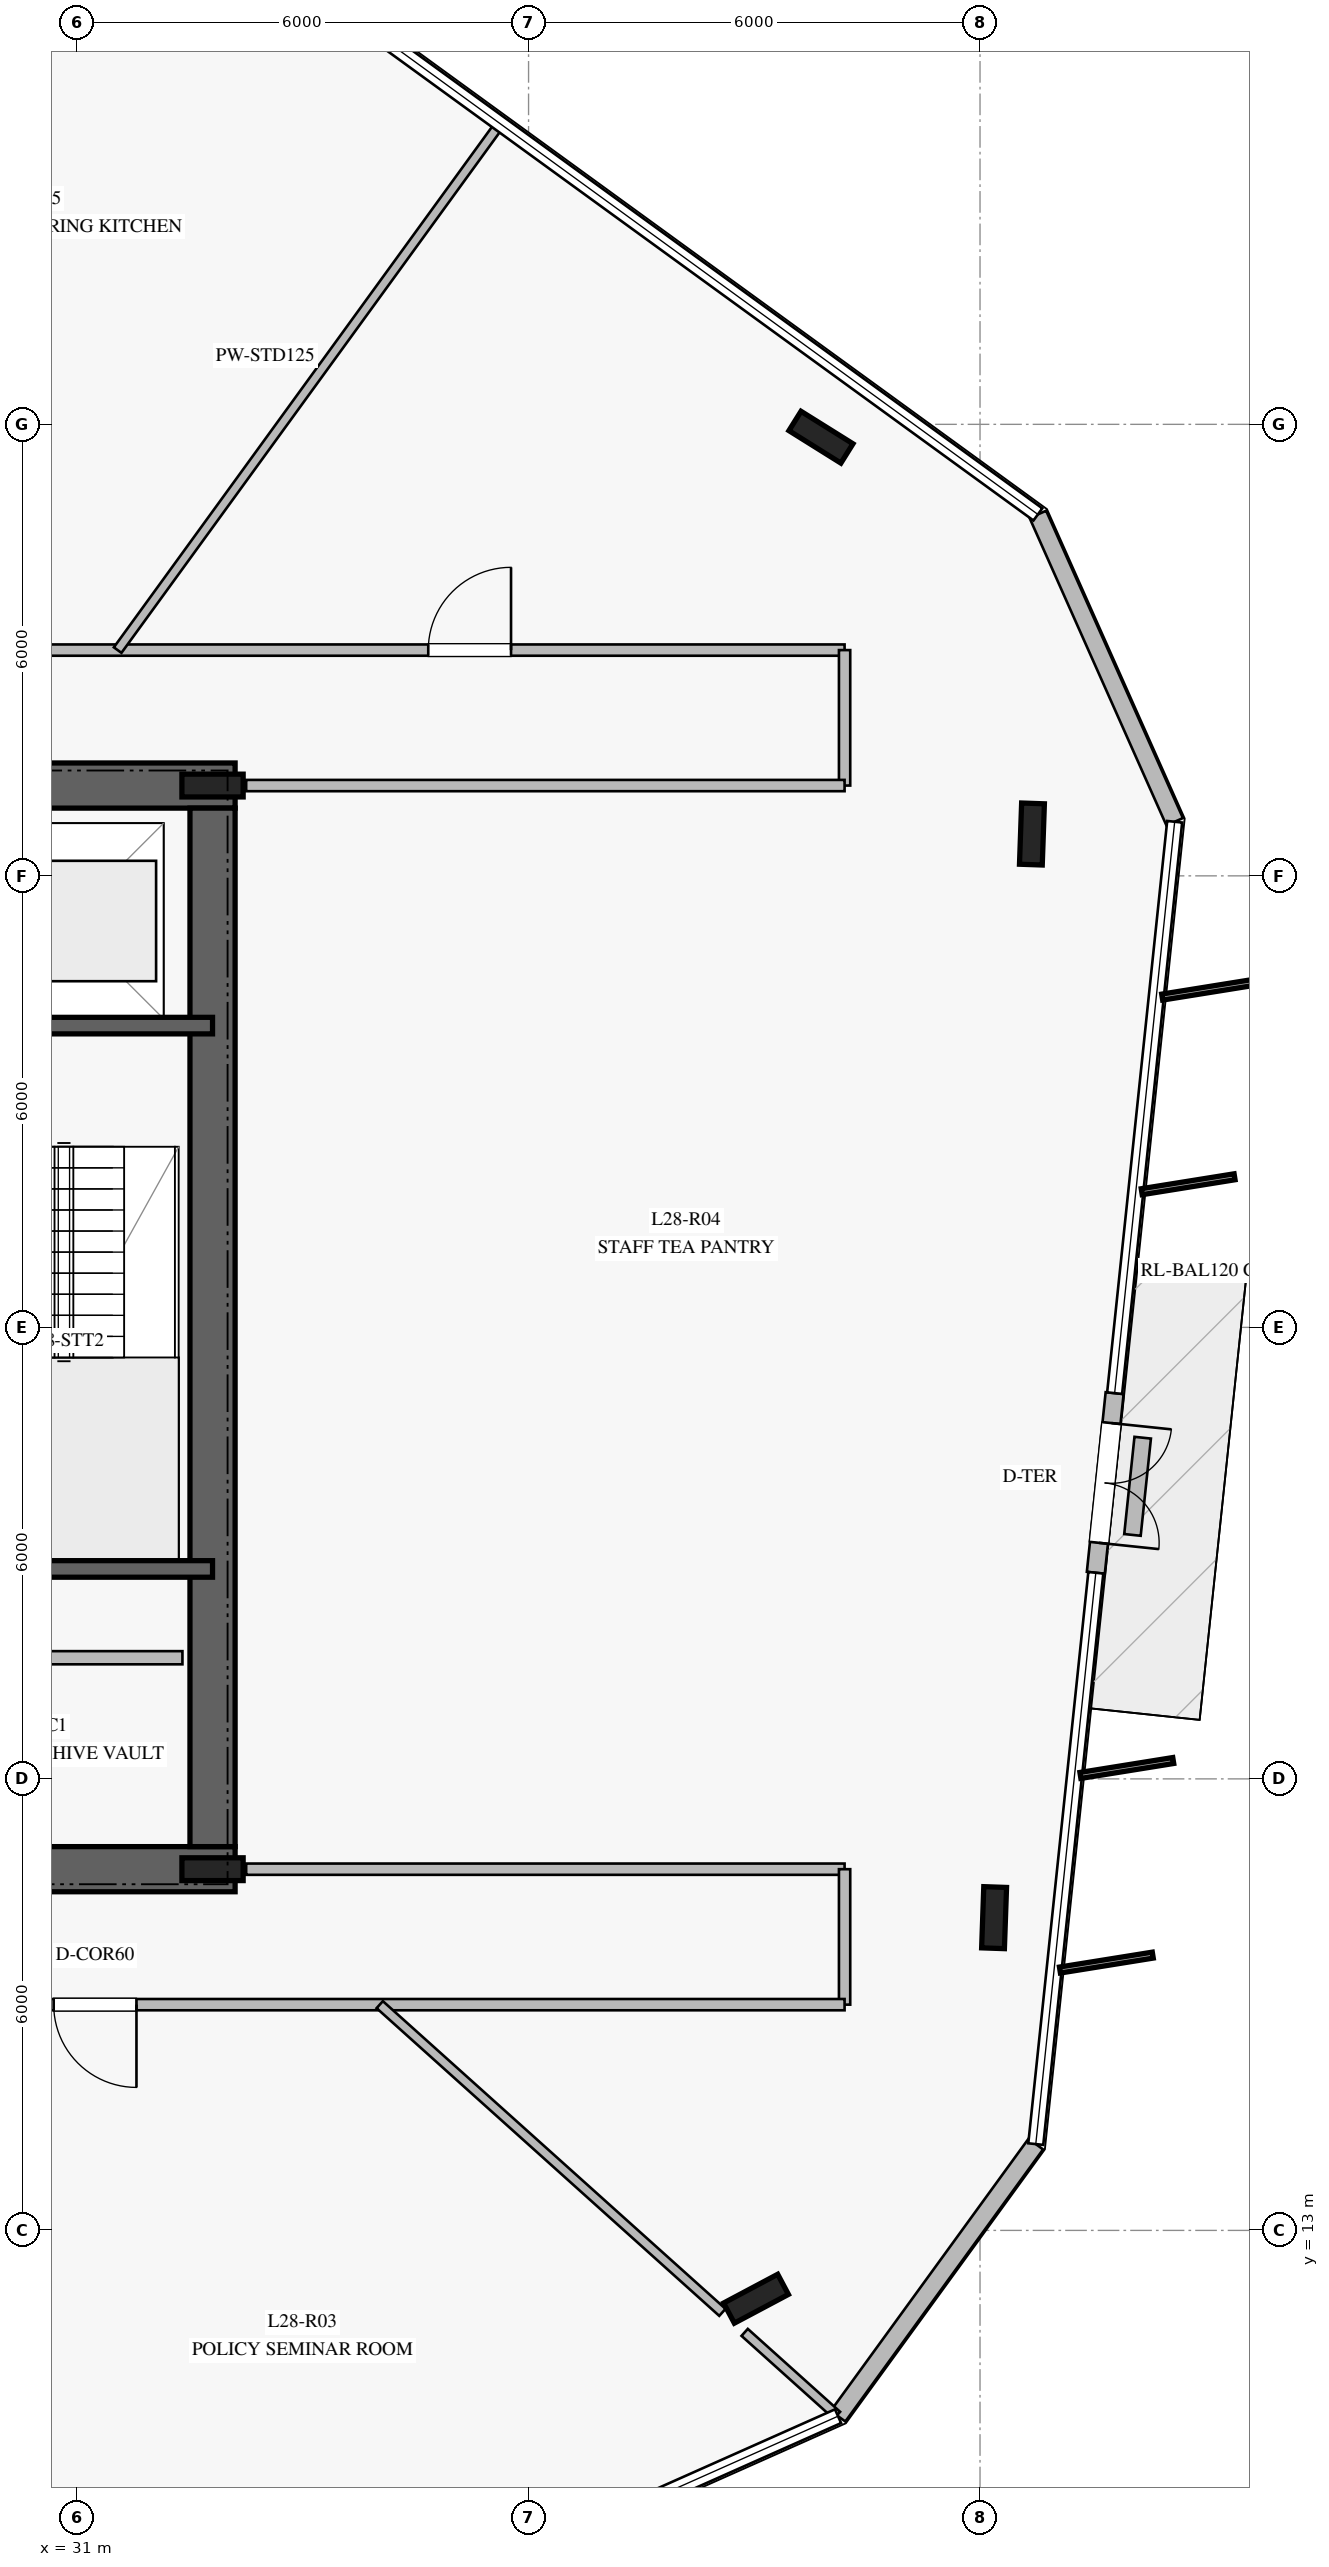
"""IFC4 building model, lengths in metres.
Left out: names, types, materials, properties, quantities, classifications, styles, units other than length and angle.
Written with IfcOpenShell. Run it as: python <this file> out.ifc"""

import sys

from ifc_helpers import new_model, si_unit, direction, frame, frame_2d, origin, origin_2d, place, context, subcontext, project, spatial, rectangle, i_section, extrude, element, fill, save


model = new_model("IFC4")
c1 = context("Model", 3, precision=1e-05, world=origin(), true_north=direction((0.0, 1.0)))
c2 = subcontext(c1, "Body", "Model", "MODEL_VIEW")
j1 = project(units=[si_unit("LENGTHUNIT", "METRE"), si_unit("PLANEANGLEUNIT", "RADIAN")], contexts=[c1])
p1 = place(None, origin())
s1 = spatial("IfcSite", under=j1, at=p1, CompositionType="ELEMENT")
p2 = place(p1, origin())
s2 = spatial("IfcBuilding", under=s1, at=p2, CompositionType="ELEMENT")
p3 = place(p2, frame((0.0, 0.0, 118.4)))
s3 = spatial("IfcBuildingStorey", under=s2, at=p3, CompositionType="ELEMENT", Elevation=118.4)
p4 = place(p3, frame((16.9, 17.8, 0.0), z_axis=(0.0, 0.0, 1.0), x_axis=(1.0, 0.0, 0.0)))
e1 = element("IfcWall", 1, at=p4, inside=s3, PredefinedType="SHEAR", context=c2, shape_type="SweptSolid", body=[
    extrude(rectangle(XDim=16.2, YDim=0.6, at=frame_2d((8.1, 0.0))), origin(), (0.0, 0.0, 1.0), 3.76),
])
p5 = place(p4, frame((5.05, 0.0, 0.0)))
e2 = element("IfcOpeningElement", 2, at=p5, cuts=e1, PredefinedType="OPENING", context=c2, shape_type="SweptSolid", body=[
    extrude(rectangle(XDim=1.2, YDim=2.25, at=frame_2d((0.6, 1.125))), frame((0.0, 0.31, 0.0), z_axis=(0.0, -1.0, 0.0), x_axis=(1.0, 0.0, 0.0)), (0.0, 0.0, 1.0), 0.62),
])
p6 = place(p4, frame((10.95, 0.0, 0.0)))
e3 = element("IfcOpeningElement", 3, at=p6, cuts=e1, PredefinedType="OPENING", context=c2, shape_type="SweptSolid", body=[
    extrude(rectangle(XDim=1.1, YDim=2.2, at=frame_2d((0.55, 1.1))), frame((0.0, 0.31, 0.0), z_axis=(0.0, -1.0, 0.0), x_axis=(1.0, 0.0, 0.0)), (0.0, 0.0, 1.0), 0.62),
])
p7 = place(p3, frame((33.1, 32.2, 0.0), z_axis=(0.0, 0.0, 1.0), x_axis=(-1.0, 0.0, 0.0)))
e4 = element("IfcWall", 4, at=p7, inside=s3, PredefinedType="SHEAR", context=c2, shape_type="SweptSolid", body=[
    extrude(rectangle(XDim=16.2, YDim=0.6, at=frame_2d((8.1, 0.0))), origin(), (0.0, 0.0, 1.0), 3.76),
])
p8 = place(p7, frame((5.05, 0.0, 0.0)))
e5 = element("IfcOpeningElement", 5, at=p8, cuts=e4, PredefinedType="OPENING", context=c2, shape_type="SweptSolid", body=[
    extrude(rectangle(XDim=1.2, YDim=2.25, at=frame_2d((0.6, 1.125))), frame((0.0, 0.31, 0.0), z_axis=(0.0, -1.0, 0.0), x_axis=(1.0, 0.0, 0.0)), (0.0, 0.0, 1.0), 0.62),
])
p9 = place(p7, frame((11.85, 0.0, 0.0)))
e6 = element("IfcOpeningElement", 6, at=p9, cuts=e4, PredefinedType="OPENING", context=c2, shape_type="SweptSolid", body=[
    extrude(rectangle(XDim=1.1, YDim=2.2, at=frame_2d((0.55, 1.1))), frame((0.0, 0.31, 0.0), z_axis=(0.0, -1.0, 0.0), x_axis=(1.0, 0.0, 0.0)), (0.0, 0.0, 1.0), 0.62),
])
p10 = place(p7, frame((9.875, 0.0, 0.0)))
e7 = element("IfcOpeningElement", 7, at=p10, cuts=e4, PredefinedType="OPENING", context=c2, shape_type="SweptSolid", body=[
    extrude(rectangle(XDim=1.1, YDim=2.2, at=frame_2d((0.55, 1.1))), frame((0.0, 0.31, 0.0), z_axis=(0.0, -1.0, 0.0), x_axis=(1.0, 0.0, 0.0)), (0.0, 0.0, 1.0), 0.62),
])
p11 = place(p7, frame((7.9, 0.0, 0.0)))
e8 = element("IfcOpeningElement", 8, at=p11, cuts=e4, PredefinedType="OPENING", context=c2, shape_type="SweptSolid", body=[
    extrude(rectangle(XDim=1.1, YDim=2.2, at=frame_2d((0.55, 1.1))), frame((0.0, 0.31, 0.0), z_axis=(0.0, -1.0, 0.0), x_axis=(1.0, 0.0, 0.0)), (0.0, 0.0, 1.0), 0.62),
])
p12 = place(p3, frame((32.8, 18.1, 0.0), z_axis=(0.0, 0.0, 1.0), x_axis=(0.0, 1.0, 0.0)))
e9 = element("IfcWall", 9, at=p12, inside=s3, PredefinedType="SHEAR", context=c2, shape_type="SweptSolid", body=[
    extrude(rectangle(XDim=13.8, YDim=0.6, at=frame_2d((6.9, 0.0))), origin(), (0.0, 0.0, 1.0), 3.76),
])
for number, where, z_axis, x_axis in (
    (10, (32.8, 17.8, 0.0), (0.0, 0.0, 1.0), (1.0, 0.0, 0.0)),
    (11, (32.8, 32.2, 0.0), (0.0, 0.0, 1.0), (1.0, 0.0, 0.0)),
):
    element("IfcColumn", number, at=place(p3, frame(where, z_axis=z_axis, x_axis=x_axis)), inside=s3, PredefinedType="COLUMN", context=c2, shape_type="SweptSolid", body=[
        extrude(i_section(OverallWidth=0.303, OverallDepth=0.814, WebThickness=0.021, FlangeThickness=0.04, at=origin_2d()), origin(), (0.0, 0.0, 1.0), 4.0),
    ])
for number, where, z_axis, x_axis in (
    (12, (29.08, 21.79, 0.0), (0.0, 0.0, 1.0), (1.0, 0.0, 0.0)),
    (13, (29.08, 29.01, 0.0), (0.0, 0.0, 1.0), (1.0, 0.0, 0.0)),
):
    element("IfcWall", number, at=place(p3, frame(where, z_axis=z_axis, x_axis=x_axis)), inside=s3, PredefinedType="SOLIDWALL", context=c2, shape_type="SweptSolid", body=[
        extrude(rectangle(XDim=3.72, YDim=0.22, at=frame_2d((1.86, 0.0))), origin(), (0.0, 0.0, 1.0), 3.76),
    ])
for number, where, z_axis, x_axis in (
    (14, (40.886, 36.829, 0.0), (0.0, 0.0, 1.0), (-0.848, 0.53, 0.0)),
    (15, (40.023, 12.092, 0.0), (0.0, 0.0, 1.0), (0.883, 0.469, 0.0)),
    (16, (43.187, 17.156, 0.0), (0.0, 0.0, 1.0), (0.035, 0.999, 0.0)),
    (17, (43.69, 31.556, 0.0), (0.0, 0.0, 1.0), (0.035, 0.999, 0.0)),
):
    element("IfcColumn", number, at=place(p3, frame(where, z_axis=z_axis, x_axis=x_axis)), inside=s3, PredefinedType="COLUMN", context=c2, shape_type="SweptSolid", body=[
        extrude(i_section(OverallWidth=0.303, OverallDepth=0.814, WebThickness=0.021, FlangeThickness=0.04, at=origin_2d()), origin(), (0.0, 0.0, 1.0), 4.0),
    ])
p13 = place(p3, frame((41.113, 10.531, 0.0), z_axis=(0.0, 0.0, 1.0), x_axis=(0.587898873753, 0.80893443136, 0.0)))
e18 = element("IfcWall", 18, at=p13, inside=s3, PredefinedType="STANDARD", context=c2, shape_type="SweptSolid", body=[
    extrude(rectangle(XDim=4.47, YDim=0.24, at=frame_2d((2.235, 0.0))), origin(), (0.0, 0.0, 1.0), 3.76),
])
p14 = place(p3, frame((44.539, 21.739, 0.0), z_axis=(0.0, 0.0, 1.0), x_axis=(0.104165836226, 0.994559942167, 0.0)))
e19 = element("IfcWall", 19, at=p14, inside=s3, PredefinedType="STANDARD", context=c2, shape_type="SweptSolid", body=[
    extrude(rectangle(XDim=2.4, YDim=0.24, at=frame_2d((1.2, 0.0))), origin(), (0.0, 0.0, 1.0), 3.76),
])
p15 = place(p14, frame((0.4, 0.0, 0.0)))
e20 = element("IfcOpeningElement", 20, at=p15, cuts=e19, PredefinedType="OPENING", context=c2, shape_type="SweptSolid", body=[
    extrude(rectangle(XDim=1.6, YDim=2.25, at=frame_2d((0.8, 1.125))), frame((0.0, 0.13, 0.0), z_axis=(0.0, -1.0, 0.0), x_axis=(1.0, 0.0, 0.0)), (0.0, 0.0, 1.0), 0.26),
])
p16 = place(p3, frame((45.587, 31.719, 0.0), z_axis=(0.0, 0.0, 1.0), x_axis=(-0.406655262741, 0.913581686159, 0.0)))
e21 = element("IfcWall", 21, at=p16, inside=s3, PredefinedType="STANDARD", context=c2, shape_type="SweptSolid", body=[
    extrude(rectangle(XDim=4.47, YDim=0.24, at=frame_2d((2.235, 0.0))), origin(), (0.0, 0.0, 1.0), 3.76),
])
p17 = place(p3, frame((45.026, 22.242, 0.0), z_axis=(0.0, 0.0, 1.0), x_axis=(0.104860863868, 0.994486902492, 0.0)))
e22 = element("IfcWall", 22, at=p17, inside=s3, PredefinedType="USERDEFINED", context=c2, shape_type="SweptSolid", body=[
    extrude(rectangle(XDim=1.299, YDim=0.22, at=frame_2d((0.649, 0.0))), origin(), (0.0, 0.0, 1.0), 0.4),
])
p18 = place(p3, frame((30.3, 20.61, 0.0), z_axis=(0.0, 0.0, 1.0), x_axis=(1.0, 0.0, 0.0)))
e23 = element("IfcWall", 23, at=p18, inside=s3, PredefinedType="PARTITIONING", context=c2, shape_type="SweptSolid", body=[
    extrude(rectangle(XDim=2.1, YDim=0.175, at=frame_2d((1.05, 0.0))), origin(), (0.0, 0.0, 1.0), 3.76),
])
p19 = place(p3, frame((25.95, 34.0, 0.0), z_axis=(0.0, 0.0, 1.0), x_axis=(1.0, 0.0, 0.0)))
e24 = element("IfcWall", 24, at=p19, inside=s3, PredefinedType="PARTITIONING", context=c2, shape_type="SweptSolid", body=[
    extrude(rectangle(XDim=15.25, YDim=0.15, at=frame_2d((7.625, 0.0))), origin(), (0.0, 0.0, 1.0), 3.21),
])
p20 = place(p19, frame((9.717, 0.0, 0.0)))
e25 = element("IfcOpeningElement", 25, at=p20, cuts=e24, PredefinedType="OPENING", context=c2, shape_type="SweptSolid", body=[
    extrude(rectangle(XDim=1.1, YDim=2.2, at=frame_2d((0.55, 1.1))), frame((0.0, 0.085, 0.0), z_axis=(0.0, -1.0, 0.0), x_axis=(1.0, 0.0, 0.0)), (0.0, 0.0, 1.0), 0.17),
])
p21 = place(p3, frame((41.2, 34.0, 0.0), z_axis=(0.0, 0.0, 1.0), x_axis=(0.0, -1.0, 0.0)))
e26 = element("IfcWall", 26, at=p21, inside=s3, PredefinedType="PARTITIONING", context=c2, shape_type="SweptSolid", body=[
    extrude(rectangle(XDim=1.8, YDim=0.15, at=frame_2d((0.9, 0.0))), origin(), (0.0, 0.0, 1.0), 3.76),
])
for number, where, z_axis, x_axis in (
    (27, (41.2, 32.2, 0.0), (0.0, 0.0, 1.0), (-1.0, 0.0, 0.0)),
    (28, (33.247, 17.8, 0.0), (0.0, 0.0, 1.0), (1.0, 0.0, 0.0)),
):
    element("IfcWall", number, at=place(p3, frame(where, z_axis=z_axis, x_axis=x_axis)), inside=s3, PredefinedType="PARTITIONING", context=c2, shape_type="SweptSolid", body=[
        extrude(rectangle(XDim=7.953, YDim=0.15, at=frame_2d((3.977, 0.0))), origin(), (0.0, 0.0, 1.0), 3.21),
    ])
p22 = place(p3, frame((41.2, 17.8, 0.0), z_axis=(0.0, 0.0, 1.0), x_axis=(0.0, -1.0, 0.0)))
e29 = element("IfcWall", 29, at=p22, inside=s3, PredefinedType="PARTITIONING", context=c2, shape_type="SweptSolid", body=[
    extrude(rectangle(XDim=1.8, YDim=0.15, at=frame_2d((0.9, 0.0))), origin(), (0.0, 0.0, 1.0), 3.21),
])
p23 = place(p3, frame((41.2, 16.0, 0.0), z_axis=(0.0, 0.0, 1.0), x_axis=(-1.0, 0.0, 0.0)))
e30 = element("IfcWall", 30, at=p23, inside=s3, PredefinedType="PARTITIONING", context=c2, shape_type="SweptSolid", body=[
    extrude(rectangle(XDim=15.25, YDim=0.15, at=frame_2d((7.625, 0.0))), origin(), (0.0, 0.0, 1.0), 3.21),
])
p24 = place(p23, frame((9.411, 0.0, 0.0)))
e31 = element("IfcOpeningElement", 31, at=p24, cuts=e30, PredefinedType="OPENING", context=c2, shape_type="SweptSolid", body=[
    extrude(rectangle(XDim=1.1, YDim=2.2, at=frame_2d((0.55, 1.1))), frame((0.0, 0.085, 0.0), z_axis=(0.0, -1.0, 0.0), x_axis=(1.0, 0.0, 0.0)), (0.0, 0.0, 1.0), 0.17),
])
p25 = place(p3, frame((31.539, 34.0, 0.0), z_axis=(0.0, 0.0, 1.0), x_axis=(0.587810002797, 0.808999011502, 0.0)))
e32 = element("IfcWall", 32, at=p25, inside=s3, PredefinedType="PARTITIONING", context=c2, shape_type="SweptSolid", body=[
    extrude(rectangle(XDim=8.63, YDim=0.125, at=frame_2d((4.315, 0.0))), origin(), (0.0, 0.0, 1.0), 3.05),
])
p26 = place(p3, frame((35.022, 16.0, 0.0), z_axis=(0.0, 0.0, 1.0), x_axis=(0.74406125681, -0.668111402472, 0.0)))
e33 = element("IfcWall", 33, at=p26, inside=s3, PredefinedType="PARTITIONING", context=c2, shape_type="SweptSolid", body=[
    extrude(rectangle(XDim=6.12, YDim=0.125, at=frame_2d((3.06, 0.0))), origin(), (0.0, 0.0, 1.0), 3.16),
])
p27 = place(p3, frame((39.872, 11.645, 0.0), z_axis=(0.0, 0.0, 1.0), x_axis=(0.743985633598, -0.668195612826, 0.0)))
e34 = element("IfcWall", 34, at=p27, inside=s3, PredefinedType="PARTITIONING", context=c2, shape_type="SweptSolid", body=[
    extrude(rectangle(XDim=1.649, YDim=0.125, at=frame_2d((0.825, 0.0))), origin(), (0.0, 0.0, 1.0), 3.76),
])
p28 = place(p15, frame((1.6, 0.0, 0.0), z_axis=(0.0, 0.0, 1.0), x_axis=(-1.0, 0.0, 0.0)))
e35 = element("IfcDoor", 35, at=p28, inside=s3, OperationType="DOUBLE_DOOR_SINGLE_SWING", PredefinedType="DOOR", context=c2, shape_type="SweptSolid", body=[
    extrude(rectangle(XDim=1.6, YDim=2.25, at=frame_2d((0.8, 1.125))), frame((0.0, 0.025, 0.0), z_axis=(0.0, -1.0, 0.0), x_axis=(1.0, 0.0, 0.0)), (0.0, 0.0, 1.0), 0.05),
])
fill(e20, e35)
p29 = place(p24, origin())
e36 = element("IfcDoor", 36, at=p29, inside=s3, OperationType="SINGLE_SWING_LEFT", PredefinedType="DOOR", context=c2, shape_type="SweptSolid", body=[
    extrude(rectangle(XDim=1.1, YDim=2.2, at=frame_2d((0.55, 1.1))), frame((0.0, 0.025, 0.0), z_axis=(0.0, -1.0, 0.0), x_axis=(1.0, 0.0, 0.0)), (0.0, 0.0, 1.0), 0.05),
])
fill(e31, e36)
p30 = place(p20, origin())
e37 = element("IfcDoor", 37, at=p30, inside=s3, OperationType="SINGLE_SWING_RIGHT", PredefinedType="DOOR", context=c2, shape_type="SweptSolid", body=[
    extrude(rectangle(XDim=1.1, YDim=2.2, at=frame_2d((0.55, 1.1))), frame((0.0, 0.025, 0.0), z_axis=(0.0, -1.0, 0.0), x_axis=(1.0, 0.0, 0.0)), (0.0, 0.0, 1.0), 0.05),
])
fill(e25, e37)
save(model, sys.argv[1])
